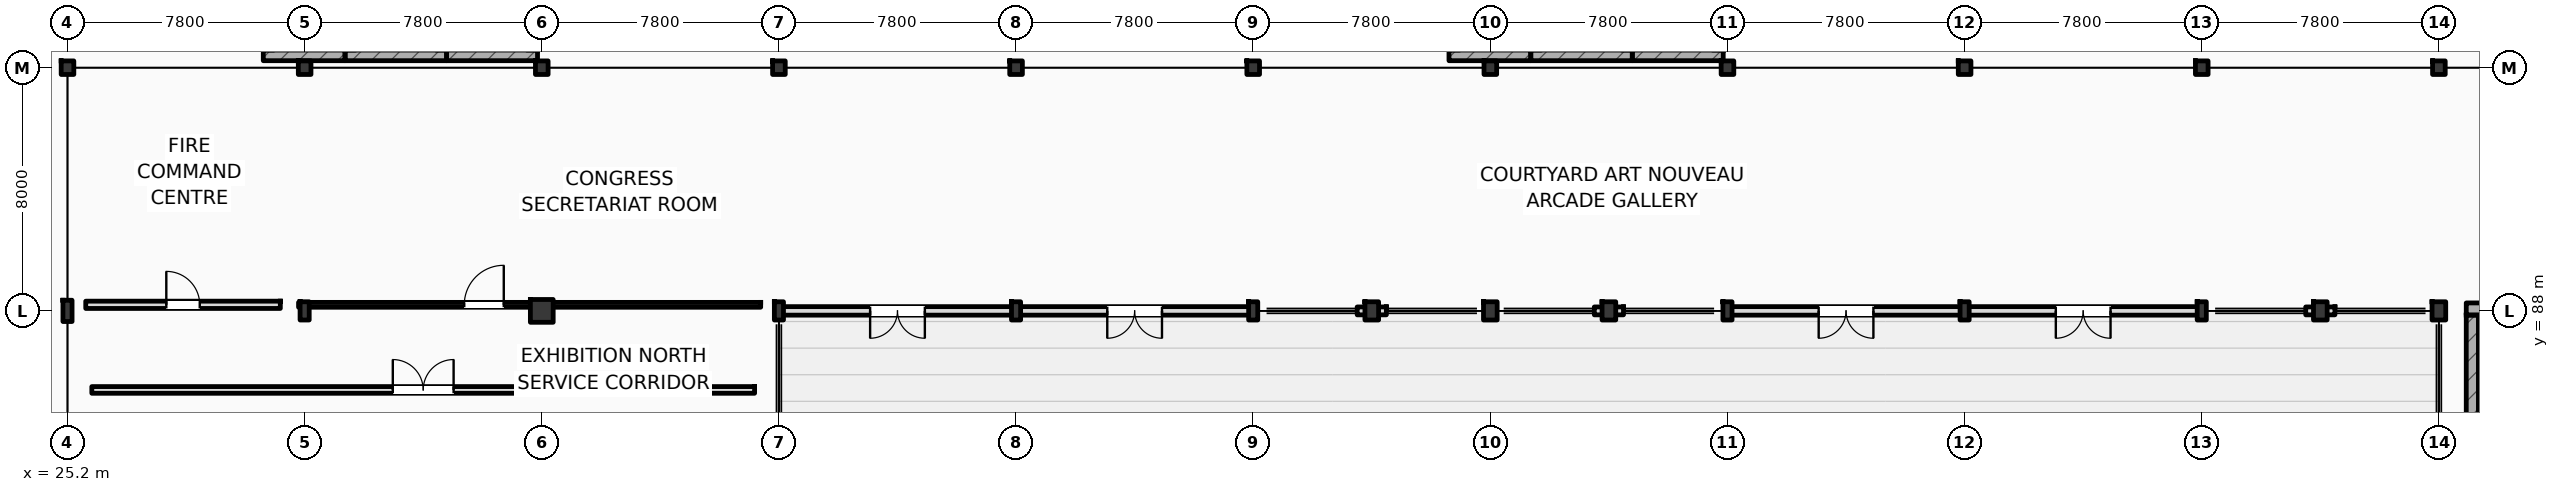
"""IFC4 building model, lengths in metres.
Left out: names, types, materials, properties, quantities, classifications, styles, units other than length and angle.
Written with IfcOpenShell. Run it as: python <this file> out.ifc"""

import sys

from ifc_helpers import new_model, si_unit, direction, frame, frame_2d, origin, origin_2d, place, context, subcontext, project, spatial, rectangle, i_section, extrude, element, fill, save


model = new_model("IFC4")
c1 = context("Model", 3, precision=1e-05, world=origin(), true_north=direction((0.0, 1.0)))
c2 = subcontext(c1, "Body", "Model", "MODEL_VIEW")
j1 = project(units=[si_unit("LENGTHUNIT", "METRE"), si_unit("PLANEANGLEUNIT", "RADIAN")], contexts=[c1])
p1 = place(None, origin())
s1 = spatial("IfcSite", under=j1, at=p1, CompositionType="ELEMENT")
p2 = place(p1, origin())
s2 = spatial("IfcBuilding", under=s1, at=p2, CompositionType="ELEMENT")
p3 = place(p2, origin())
s3 = spatial("IfcBuildingStorey", under=s2, at=p3, CompositionType="ELEMENT", Elevation=0.0)
p4 = place(p3, frame((25.2, 88.0, 0.0), z_axis=(0.0, 0.0, 1.0), x_axis=(1.0, 0.0, 0.0)))
e1 = element("IfcColumn", 1, at=p4, inside=s3, PredefinedType="COLUMN", context=c2, shape_type="SweptSolid", body=[
    extrude(i_section(OverallWidth=0.3, OverallDepth=0.7, WebThickness=0.017, FlangeThickness=0.032, FilletRadius=0.027, at=origin_2d()), origin(), (0.0, 0.0, 1.0), 6.0),
])
for number, where, z_axis, x_axis in (
    (2, (25.2, 96.0, 0.0), (0.0, 0.0, 1.0), (1.0, 0.0, 0.0)),
    (3, (33.0, 96.0, 0.0), (0.0, 0.0, 1.0), (1.0, 0.0, 0.0)),
    (4, (40.8, 96.0, 0.0), (0.0, 0.0, 1.0), (1.0, 0.0, 0.0)),
    (5, (48.6, 96.0, 0.0), (0.0, 0.0, 1.0), (1.0, 0.0, 0.0)),
    (6, (56.4, 96.0, 0.0), (0.0, 0.0, 1.0), (1.0, 0.0, 0.0)),
    (7, (64.2, 96.0, 0.0), (0.0, 0.0, 1.0), (1.0, 0.0, 0.0)),
    (8, (72.0, 96.0, 0.0), (0.0, 0.0, 1.0), (1.0, 0.0, 0.0)),
    (9, (79.8, 96.0, 0.0), (0.0, 0.0, 1.0), (1.0, 0.0, 0.0)),
    (10, (87.6, 96.0, 0.0), (0.0, 0.0, 1.0), (1.0, 0.0, 0.0)),
    (11, (95.4, 96.0, 0.0), (0.0, 0.0, 1.0), (1.0, 0.0, 0.0)),
    (12, (103.2, 96.0, 0.0), (0.0, 0.0, 1.0), (1.0, 0.0, 0.0)),
):
    element("IfcColumn", number, at=place(p3, frame(where, z_axis=z_axis, x_axis=x_axis)), inside=s3, PredefinedType="COLUMN", context=c2, shape_type="SweptSolid", body=[
        extrude(i_section(OverallWidth=0.416, OverallDepth=0.446, WebThickness=0.036, FlangeThickness=0.048, FilletRadius=0.015, at=origin_2d()), origin(), (0.0, 0.0, 1.0), 6.0),
    ])
p5 = place(p3, frame((33.0, 88.0, 0.0), z_axis=(0.0, 0.0, 1.0), x_axis=(1.0, 0.0, 0.0)))
e13 = element("IfcColumn", 13, at=p5, inside=s3, PredefinedType="COLUMN", context=c2, shape_type="SweptSolid", body=[
    extrude(i_section(OverallWidth=0.3, OverallDepth=0.6, WebThickness=0.015, FlangeThickness=0.03, FilletRadius=0.027, at=origin_2d()), origin(), (0.0, 0.0, 1.0), 6.0),
])
p6 = place(p3, frame((40.8, 88.0, 0.0), z_axis=(0.0, 0.0, 1.0), x_axis=(1.0, 0.0, 0.0)))
e14 = element("IfcColumn", 14, at=p6, inside=s3, PredefinedType="COLUMN", context=c2, shape_type="SweptSolid", body=[
    extrude(rectangle(XDim=0.75, YDim=0.75, at=origin_2d()), origin(), (0.0, 0.0, 1.0), 6.0),
])
for number, where, z_axis, x_axis in (
    (15, (48.6, 88.0, 0.0), (0.0, 0.0, 1.0), (1.0, 0.0, 0.0)),
    (16, (56.4, 88.0, 0.0), (0.0, 0.0, 1.0), (1.0, 0.0, 0.0)),
    (17, (64.2, 88.0, 0.0), (0.0, 0.0, 1.0), (1.0, 0.0, 0.0)),
):
    element("IfcColumn", number, at=place(p3, frame(where, z_axis=z_axis, x_axis=x_axis)), inside=s3, PredefinedType="COLUMN", context=c2, shape_type="SweptSolid", body=[
        extrude(i_section(OverallWidth=0.3, OverallDepth=0.6, WebThickness=0.015, FlangeThickness=0.03, FilletRadius=0.027, at=origin_2d()), origin(), (0.0, 0.0, 1.0), 6.0),
    ])
p7 = place(p3, frame((72.0, 88.0, 0.0), z_axis=(0.0, 0.0, 1.0), x_axis=(1.0, 0.0, 0.0)))
e18 = element("IfcColumn", 18, at=p7, inside=s3, PredefinedType="PILASTER", context=c2, shape_type="SweptSolid", body=[
    extrude(rectangle(XDim=0.45, YDim=0.6, at=origin_2d()), origin(), (0.0, 0.0, 1.0), 6.0),
])
for number, where, z_axis, x_axis in (
    (19, (79.8, 88.0, 0.0), (0.0, 0.0, 1.0), (1.0, 0.0, 0.0)),
    (20, (87.6, 88.0, 0.0), (0.0, 0.0, 1.0), (1.0, 0.0, 0.0)),
    (21, (95.4, 88.0, 0.0), (0.0, 0.0, 1.0), (1.0, 0.0, 0.0)),
):
    element("IfcColumn", number, at=place(p3, frame(where, z_axis=z_axis, x_axis=x_axis)), inside=s3, PredefinedType="COLUMN", context=c2, shape_type="SweptSolid", body=[
        extrude(i_section(OverallWidth=0.3, OverallDepth=0.6, WebThickness=0.015, FlangeThickness=0.03, FilletRadius=0.027, at=origin_2d()), origin(), (0.0, 0.0, 1.0), 6.0),
    ])
for number, where, z_axis, x_axis in (
    (22, (103.2, 88.0, 0.0), (0.0, 0.0, 1.0), (1.0, 0.0, 0.0)),
    (23, (68.1, 88.0, 0.0), (0.0, 0.0, 1.0), (1.0, 0.0, 0.0)),
    (24, (75.9, 88.0, 0.0), (0.0, 0.0, 1.0), (1.0, 0.0, 0.0)),
    (25, (99.3, 88.0, 0.0), (0.0, 0.0, 1.0), (1.0, 0.0, 0.0)),
):
    element("IfcColumn", number, at=place(p3, frame(where, z_axis=z_axis, x_axis=x_axis)), inside=s3, PredefinedType="PILASTER", context=c2, shape_type="SweptSolid", body=[
        extrude(rectangle(XDim=0.45, YDim=0.6, at=origin_2d()), origin(), (0.0, 0.0, 1.0), 6.0),
    ])
p8 = place(p3, frame((104.1, 88.062, 0.0), z_axis=(0.0, 0.0, 1.0), x_axis=(1.0, 0.0, 0.0)))
e26 = element("IfcWall", 26, at=p8, inside=s3, PredefinedType="SHEAR", context=c2, shape_type="SweptSolid", body=[
    extrude(rectangle(XDim=4.96, YDim=0.4, at=frame_2d((2.48, 0.0))), origin(), (0.0, 0.0, 1.0), 6.0),
])
p9 = place(p3, frame((104.3, 78.75, 0.0), z_axis=(0.0, 0.0, 1.0), x_axis=(0.0, 1.0, 0.0)))
e27 = element("IfcWall", 27, at=p9, inside=s3, PredefinedType="SHEAR", context=c2, shape_type="SweptSolid", body=[
    extrude(rectangle(XDim=9.112, YDim=0.4, at=frame_2d((4.556, 0.0))), origin(), (0.0, 0.0, 1.0), 6.0),
])
p10 = place(p3, frame((48.6, 88.0, 0.0), z_axis=(0.0, 0.0, 1.0), x_axis=(1.0, 0.0, 0.0)))
e28 = element("IfcWall", 28, at=p10, inside=s3, PredefinedType="STANDARD", context=c2, shape_type="SweptSolid", body=[
    extrude(rectangle(XDim=7.8, YDim=0.28, at=frame_2d((3.9, 0.0))), origin(), (0.0, 0.0, 1.0), 5.19),
])
p11 = place(p10, frame((3.0, 0.0, 0.0)))
e29 = element("IfcOpeningElement", 29, at=p11, cuts=e28, PredefinedType="OPENING", context=c2, shape_type="SweptSolid", body=[
    extrude(rectangle(XDim=1.8, YDim=2.4, at=frame_2d((0.9, 1.2))), frame((0.0, 0.15, 0.0), z_axis=(0.0, -1.0, 0.0), x_axis=(1.0, 0.0, 0.0)), (0.0, 0.0, 1.0), 0.3),
])
p12 = place(p3, frame((56.4, 88.0, 0.0), z_axis=(0.0, 0.0, 1.0), x_axis=(1.0, 0.0, 0.0)))
e30 = element("IfcWall", 30, at=p12, inside=s3, PredefinedType="STANDARD", context=c2, shape_type="SweptSolid", body=[
    extrude(rectangle(XDim=7.8, YDim=0.28, at=frame_2d((3.9, 0.0))), origin(), (0.0, 0.0, 1.0), 5.19),
])
p13 = place(p12, frame((3.0, 0.0, 0.0)))
e31 = element("IfcOpeningElement", 31, at=p13, cuts=e30, PredefinedType="OPENING", context=c2, shape_type="SweptSolid", body=[
    extrude(rectangle(XDim=1.8, YDim=2.4, at=frame_2d((0.9, 1.2))), frame((0.0, 0.15, 0.0), z_axis=(0.0, -1.0, 0.0), x_axis=(1.0, 0.0, 0.0)), (0.0, 0.0, 1.0), 0.3),
])
for number, where, z_axis, x_axis in (
    (32, (67.62, 88.0, 0.0), (0.0, 0.0, 1.0), (1.0, 0.0, 0.0)),
    (33, (75.42, 88.0, 0.0), (0.0, 0.0, 1.0), (1.0, 0.0, 0.0)),
):
    element("IfcWall", number, at=place(p3, frame(where, z_axis=z_axis, x_axis=x_axis)), inside=s3, PredefinedType="STANDARD", context=c2, shape_type="SweptSolid", body=[
        extrude(rectangle(XDim=0.96, YDim=0.26, at=frame_2d((0.48, 0.0))), origin(), (0.0, 0.0, 1.0), 5.19),
    ])
p14 = place(p3, frame((79.8, 88.0, 0.0), z_axis=(0.0, 0.0, 1.0), x_axis=(1.0, 0.0, 0.0)))
e34 = element("IfcWall", 34, at=p14, inside=s3, PredefinedType="STANDARD", context=c2, shape_type="SweptSolid", body=[
    extrude(rectangle(XDim=7.8, YDim=0.28, at=frame_2d((3.9, 0.0))), origin(), (0.0, 0.0, 1.0), 5.19),
])
p15 = place(p14, frame((3.0, 0.0, 0.0)))
e35 = element("IfcOpeningElement", 35, at=p15, cuts=e34, PredefinedType="OPENING", context=c2, shape_type="SweptSolid", body=[
    extrude(rectangle(XDim=1.8, YDim=2.4, at=frame_2d((0.9, 1.2))), frame((0.0, 0.15, 0.0), z_axis=(0.0, -1.0, 0.0), x_axis=(1.0, 0.0, 0.0)), (0.0, 0.0, 1.0), 0.3),
])
p16 = place(p3, frame((87.6, 88.0, 0.0), z_axis=(0.0, 0.0, 1.0), x_axis=(1.0, 0.0, 0.0)))
e36 = element("IfcWall", 36, at=p16, inside=s3, PredefinedType="STANDARD", context=c2, shape_type="SweptSolid", body=[
    extrude(rectangle(XDim=7.8, YDim=0.28, at=frame_2d((3.9, 0.0))), origin(), (0.0, 0.0, 1.0), 5.19),
])
p17 = place(p16, frame((3.0, 0.0, 0.0)))
e37 = element("IfcOpeningElement", 37, at=p17, cuts=e36, PredefinedType="OPENING", context=c2, shape_type="SweptSolid", body=[
    extrude(rectangle(XDim=1.8, YDim=2.4, at=frame_2d((0.9, 1.2))), frame((0.0, 0.15, 0.0), z_axis=(0.0, -1.0, 0.0), x_axis=(1.0, 0.0, 0.0)), (0.0, 0.0, 1.0), 0.3),
])
p18 = place(p3, frame((98.82, 88.0, 0.0), z_axis=(0.0, 0.0, 1.0), x_axis=(1.0, 0.0, 0.0)))
e38 = element("IfcWall", 38, at=p18, inside=s3, PredefinedType="STANDARD", context=c2, shape_type="SweptSolid", body=[
    extrude(rectangle(XDim=0.96, YDim=0.26, at=frame_2d((0.48, 0.0))), origin(), (0.0, 0.0, 1.0), 5.19),
])
for number, where, z_axis, x_axis in (
    (39, (31.64, 96.405, 0.0), (0.0, 0.0, 1.0), (1.0, 0.0, 0.0)),
    (40, (70.64, 96.405, 0.0), (0.0, 0.0, 1.0), (1.0, 0.0, 0.0)),
):
    element("IfcWall", number, at=place(p3, frame(where, z_axis=z_axis, x_axis=x_axis)), inside=s3, PredefinedType="SHEAR", context=c2, shape_type="SweptSolid", body=[
        extrude(rectangle(XDim=2.69, YDim=0.35, at=frame_2d((1.345, 0.0))), origin(), (0.0, 0.0, 1.0), 5.7),
    ])
p19 = place(p3, frame((34.33, 96.405, 0.0), z_axis=(0.0, 0.0, 1.0), x_axis=(1.0, 0.0, 0.0)))
e41 = element("IfcWall", 41, at=p19, inside=s3, PredefinedType="SHEAR", context=c2, shape_type="SweptSolid", body=[
    extrude(rectangle(XDim=3.34, YDim=0.35, at=frame_2d((1.67, 0.0))), origin(), (0.0, 0.0, 1.0), 5.7),
])
p20 = place(p3, frame((37.67, 96.405, 0.0), z_axis=(0.0, 0.0, 1.0), x_axis=(1.0, 0.0, 0.0)))
e42 = element("IfcWall", 42, at=p20, inside=s3, PredefinedType="SHEAR", context=c2, shape_type="SweptSolid", body=[
    extrude(rectangle(XDim=2.99, YDim=0.35, at=frame_2d((1.495, 0.0))), origin(), (0.0, 0.0, 1.0), 5.7),
])
p21 = place(p3, frame((73.33, 96.405, 0.0), z_axis=(0.0, 0.0, 1.0), x_axis=(1.0, 0.0, 0.0)))
e43 = element("IfcWall", 43, at=p21, inside=s3, PredefinedType="SHEAR", context=c2, shape_type="SweptSolid", body=[
    extrude(rectangle(XDim=3.34, YDim=0.35, at=frame_2d((1.67, 0.0))), origin(), (0.0, 0.0, 1.0), 5.7),
])
p22 = place(p3, frame((76.67, 96.405, 0.0), z_axis=(0.0, 0.0, 1.0), x_axis=(1.0, 0.0, 0.0)))
e44 = element("IfcWall", 44, at=p22, inside=s3, PredefinedType="SHEAR", context=c2, shape_type="SweptSolid", body=[
    extrude(rectangle(XDim=2.99, YDim=0.35, at=frame_2d((1.495, 0.0))), origin(), (0.0, 0.0, 1.0), 5.7),
])
p23 = place(p3, frame((26.0, 85.4, 0.0), z_axis=(0.0, 0.0, 1.0), x_axis=(1.0, 0.0, 0.0)))
e45 = element("IfcWall", 45, at=p23, inside=s3, PredefinedType="PARTITIONING", context=c2, shape_type="SweptSolid", body=[
    extrude(rectangle(XDim=21.8, YDim=0.22, at=frame_2d((10.9, 0.0))), origin(), (0.0, 0.0, 1.0), 5.7),
])
p24 = place(p23, frame((9.9, 0.0, 0.0)))
e46 = element("IfcOpeningElement", 46, at=p24, cuts=e45, PredefinedType="OPENING", context=c2, shape_type="SweptSolid", body=[
    extrude(rectangle(XDim=2.0, YDim=2.35, at=frame_2d((1.0, 1.175))), frame((0.0, 0.12, 0.0), z_axis=(0.0, -1.0, 0.0), x_axis=(1.0, 0.0, 0.0)), (0.0, 0.0, 1.0), 0.24),
])
p25 = place(p3, frame((25.8, 88.2, 0.0), z_axis=(0.0, 0.0, 1.0), x_axis=(1.0, 0.0, 0.0)))
e47 = element("IfcWall", 47, at=p25, inside=s3, PredefinedType="STANDARD", context=c2, shape_type="SweptSolid", body=[
    extrude(rectangle(XDim=6.4, YDim=0.24, at=frame_2d((3.2, 0.0))), origin(), (0.0, 0.0, 1.0), 5.19),
])
p26 = place(p25, frame((2.65, 0.0, 0.0)))
e48 = element("IfcOpeningElement", 48, at=p26, cuts=e47, PredefinedType="OPENING", context=c2, shape_type="SweptSolid", body=[
    extrude(rectangle(XDim=1.1, YDim=2.2, at=frame_2d((0.55, 1.1))), frame((0.0, 0.13, 0.0), z_axis=(0.0, -1.0, 0.0), x_axis=(1.0, 0.0, 0.0)), (0.0, 0.0, 1.0), 0.26),
])
p27 = place(p3, frame((32.8, 88.2, 0.0), z_axis=(0.0, 0.0, 1.0), x_axis=(1.0, 0.0, 0.0)))
e49 = element("IfcWall", 49, at=p27, inside=s3, PredefinedType="PARTITIONING", context=c2, shape_type="SweptSolid", body=[
    extrude(rectangle(XDim=15.2, YDim=0.16, at=frame_2d((7.6, 0.0))), origin(), (0.0, 0.0, 1.0), 5.19),
])
p28 = place(p27, frame((5.45, 0.0, 0.0)))
e50 = element("IfcOpeningElement", 50, at=p28, cuts=e49, PredefinedType="OPENING", context=c2, shape_type="SweptSolid", body=[
    extrude(rectangle(XDim=1.3, YDim=2.2, at=frame_2d((0.65, 1.1))), frame((0.0, 0.09, 0.0), z_axis=(0.0, -1.0, 0.0), x_axis=(1.0, 0.0, 0.0)), (0.0, 0.0, 1.0), 0.18),
])
p29 = place(p11, frame((1.8, 0.0, 0.0), z_axis=(0.0, 0.0, 1.0), x_axis=(-1.0, 0.0, 0.0)))
e51 = element("IfcDoor", 51, at=p29, inside=s3, OperationType="DOUBLE_SWING_LEFT", PredefinedType="DOOR", context=c2, shape_type="SweptSolid", body=[
    extrude(rectangle(XDim=1.8, YDim=2.4, at=frame_2d((0.9, 1.2))), frame((0.0, 0.025, 0.0), z_axis=(0.0, -1.0, 0.0), x_axis=(1.0, 0.0, 0.0)), (0.0, 0.0, 1.0), 0.05),
])
fill(e29, e51)
p30 = place(p13, frame((1.8, 0.0, 0.0), z_axis=(0.0, 0.0, 1.0), x_axis=(-1.0, 0.0, 0.0)))
e52 = element("IfcDoor", 52, at=p30, inside=s3, OperationType="DOUBLE_SWING_LEFT", PredefinedType="DOOR", context=c2, shape_type="SweptSolid", body=[
    extrude(rectangle(XDim=1.8, YDim=2.4, at=frame_2d((0.9, 1.2))), frame((0.0, 0.025, 0.0), z_axis=(0.0, -1.0, 0.0), x_axis=(1.0, 0.0, 0.0)), (0.0, 0.0, 1.0), 0.05),
])
fill(e31, e52)
p31 = place(p15, frame((1.8, 0.0, 0.0), z_axis=(0.0, 0.0, 1.0), x_axis=(-1.0, 0.0, 0.0)))
e53 = element("IfcDoor", 53, at=p31, inside=s3, OperationType="DOUBLE_SWING_LEFT", PredefinedType="DOOR", context=c2, shape_type="SweptSolid", body=[
    extrude(rectangle(XDim=1.8, YDim=2.4, at=frame_2d((0.9, 1.2))), frame((0.0, 0.025, 0.0), z_axis=(0.0, -1.0, 0.0), x_axis=(1.0, 0.0, 0.0)), (0.0, 0.0, 1.0), 0.05),
])
fill(e35, e53)
p32 = place(p17, frame((1.8, 0.0, 0.0), z_axis=(0.0, 0.0, 1.0), x_axis=(-1.0, 0.0, 0.0)))
e54 = element("IfcDoor", 54, at=p32, inside=s3, OperationType="DOUBLE_SWING_LEFT", PredefinedType="DOOR", context=c2, shape_type="SweptSolid", body=[
    extrude(rectangle(XDim=1.8, YDim=2.4, at=frame_2d((0.9, 1.2))), frame((0.0, 0.025, 0.0), z_axis=(0.0, -1.0, 0.0), x_axis=(1.0, 0.0, 0.0)), (0.0, 0.0, 1.0), 0.05),
])
fill(e37, e54)
p33 = place(p24, origin())
e55 = element("IfcDoor", 55, at=p33, inside=s3, OperationType="DOUBLE_SWING_LEFT", PredefinedType="DOOR", context=c2, shape_type="SweptSolid", body=[
    extrude(rectangle(XDim=2.0, YDim=2.35, at=frame_2d((1.0, 1.175))), frame((0.0, 0.025, 0.0), z_axis=(0.0, -1.0, 0.0), x_axis=(1.0, 0.0, 0.0)), (0.0, 0.0, 1.0), 0.05),
])
fill(e46, e55)
p34 = place(p26, origin())
e56 = element("IfcDoor", 56, at=p34, inside=s3, OperationType="SINGLE_SWING_LEFT", PredefinedType="DOOR", context=c2, shape_type="SweptSolid", body=[
    extrude(rectangle(XDim=1.1, YDim=2.2, at=frame_2d((0.55, 1.1))), frame((0.0, 0.025, 0.0), z_axis=(0.0, -1.0, 0.0), x_axis=(1.0, 0.0, 0.0)), (0.0, 0.0, 1.0), 0.05),
])
fill(e48, e56)
p35 = place(p28, origin())
e57 = element("IfcDoor", 57, at=p35, inside=s3, OperationType="SINGLE_SWING_RIGHT", PredefinedType="DOOR", context=c2, shape_type="SweptSolid", body=[
    extrude(rectangle(XDim=1.3, YDim=2.2, at=frame_2d((0.65, 1.1))), frame((0.0, 0.025, 0.0), z_axis=(0.0, -1.0, 0.0), x_axis=(1.0, 0.0, 0.0)), (0.0, 0.0, 1.0), 0.05),
])
fill(e50, e57)
save(model, sys.argv[1])
